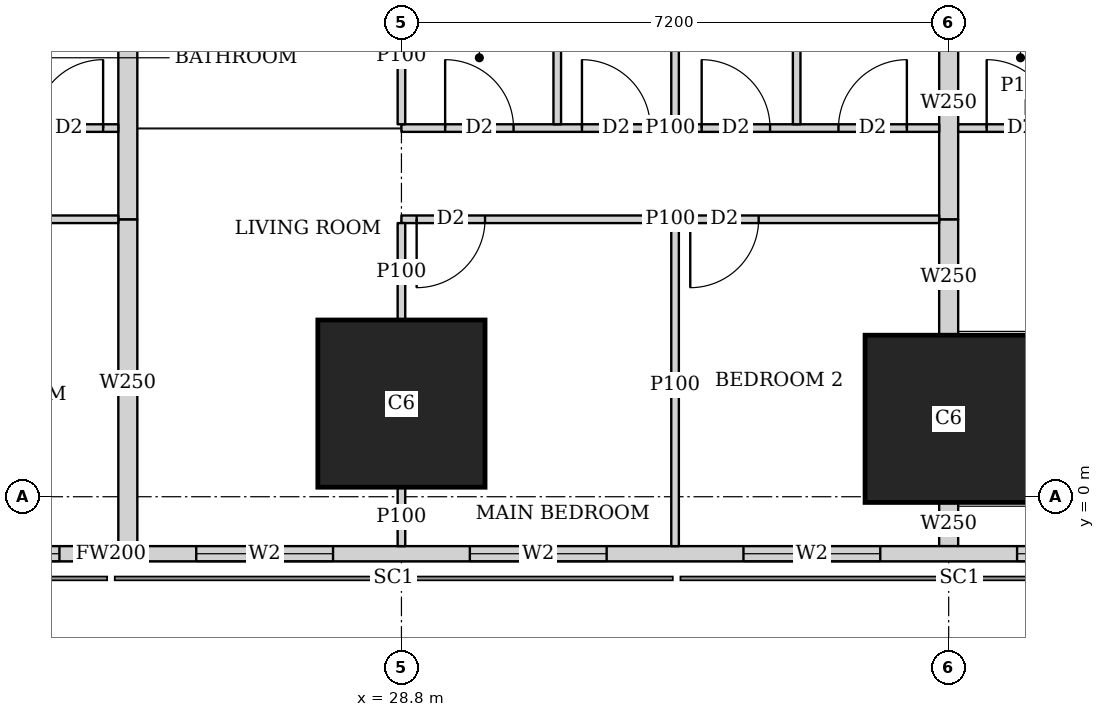
"""IFC4 building model, lengths in metres.
Left out: names, types, materials, properties, quantities, classifications, styles, units other than length and angle.
Written with IfcOpenShell. Run it as: python <this file> out.ifc"""

import sys

from ifc_helpers import new_model, si_unit, direction, frame, frame_2d, origin, origin_2d, place, context, subcontext, project, spatial, rectangle, extrude, element, fill, save


model = new_model("IFC4")
c1 = context("Model", 3, precision=1e-05, world=origin(), true_north=direction((0.0, 1.0)))
c2 = subcontext(c1, "Body", "Model", "MODEL_VIEW")
j1 = project(units=[si_unit("LENGTHUNIT", "METRE"), si_unit("PLANEANGLEUNIT", "RADIAN")], contexts=[c1])
p1 = place(None, origin())
s1 = spatial("IfcSite", under=j1, at=p1, CompositionType="ELEMENT")
p2 = place(p1, origin())
s2 = spatial("IfcBuilding", under=s1, at=p2, CompositionType="ELEMENT")
p3 = place(p2, frame((0.0, 0.0, 89.15)))
s3 = spatial("IfcBuildingStorey", under=s2, at=p3, CompositionType="ELEMENT", Elevation=89.15)
for number, where, z_axis, x_axis in (
    (1, (28.8, 1.225, 0.0), (0.0, 0.0, 1.0), (1.0, 0.0, 0.0)),
    (2, (36.0, 1.025, 0.0), (0.0, 0.0, 1.0), (1.0, 0.0, 0.0)),
):
    element("IfcColumn", number, at=place(p3, frame(where, z_axis=z_axis, x_axis=x_axis)), inside=s3, PredefinedType="COLUMN", context=c2, shape_type="SweptSolid", body=[
        extrude(rectangle(XDim=2.2, YDim=2.2, at=origin_2d()), origin(), (0.0, 0.0, 1.0), 3.75),
    ])
p4 = place(p3, frame((2.163, -0.75, 0.0), z_axis=(0.0, 0.0, 1.0), x_axis=(1.0, 0.0, 0.0)))
e3 = element("IfcWall", 3, at=p4, inside=s3, PredefinedType="SOLIDWALL", context=c2, shape_type="SweptSolid", body=[
    extrude(rectangle(XDim=45.628, YDim=0.2, at=frame_2d((22.814, 0.0))), origin(), (0.0, 0.0, 1.0), 3.5),
])
p5 = place(p4, frame((9.537, 0.0, 0.9)))
e4 = element("IfcOpeningElement", 4, at=p5, cuts=e3, PredefinedType="OPENING", context=c2, shape_type="SweptSolid", body=[
    extrude(rectangle(XDim=1.8, YDim=1.5, at=frame_2d((0.9, 0.75))), frame((0.0, 0.11, 0.0), z_axis=(0.0, -1.0, 0.0), x_axis=(1.0, 0.0, 0.0)), (0.0, 0.0, 1.0), 0.22),
])
p6 = place(p4, frame((13.137, 0.0, 0.9)))
e5 = element("IfcOpeningElement", 5, at=p6, cuts=e3, PredefinedType="OPENING", context=c2, shape_type="SweptSolid", body=[
    extrude(rectangle(XDim=1.8, YDim=1.5, at=frame_2d((0.9, 0.75))), frame((0.0, 0.11, 0.0), z_axis=(0.0, -1.0, 0.0), x_axis=(1.0, 0.0, 0.0)), (0.0, 0.0, 1.0), 0.22),
])
p7 = place(p4, frame((16.737, 0.0, 0.9)))
e6 = element("IfcOpeningElement", 6, at=p7, cuts=e3, PredefinedType="OPENING", context=c2, shape_type="SweptSolid", body=[
    extrude(rectangle(XDim=1.8, YDim=1.5, at=frame_2d((0.9, 0.75))), frame((0.0, 0.11, 0.0), z_axis=(0.0, -1.0, 0.0), x_axis=(1.0, 0.0, 0.0)), (0.0, 0.0, 1.0), 0.22),
])
p8 = place(p4, frame((20.337, 0.0, 0.9)))
e7 = element("IfcOpeningElement", 7, at=p8, cuts=e3, PredefinedType="OPENING", context=c2, shape_type="SweptSolid", body=[
    extrude(rectangle(XDim=1.8, YDim=1.5, at=frame_2d((0.9, 0.75))), frame((0.0, 0.11, 0.0), z_axis=(0.0, -1.0, 0.0), x_axis=(1.0, 0.0, 0.0)), (0.0, 0.0, 1.0), 0.22),
])
p9 = place(p4, frame((23.937, 0.0, 0.9)))
e8 = element("IfcOpeningElement", 8, at=p9, cuts=e3, PredefinedType="OPENING", context=c2, shape_type="SweptSolid", body=[
    extrude(rectangle(XDim=1.8, YDim=1.5, at=frame_2d((0.9, 0.75))), frame((0.0, 0.11, 0.0), z_axis=(0.0, -1.0, 0.0), x_axis=(1.0, 0.0, 0.0)), (0.0, 0.0, 1.0), 0.22),
])
p10 = place(p4, frame((27.537, 0.0, 0.9)))
e9 = element("IfcOpeningElement", 9, at=p10, cuts=e3, PredefinedType="OPENING", context=c2, shape_type="SweptSolid", body=[
    extrude(rectangle(XDim=1.8, YDim=1.5, at=frame_2d((0.9, 0.75))), frame((0.0, 0.11, 0.0), z_axis=(0.0, -1.0, 0.0), x_axis=(1.0, 0.0, 0.0)), (0.0, 0.0, 1.0), 0.22),
])
p11 = place(p4, frame((31.137, 0.0, 0.9)))
e10 = element("IfcOpeningElement", 10, at=p11, cuts=e3, PredefinedType="OPENING", context=c2, shape_type="SweptSolid", body=[
    extrude(rectangle(XDim=1.8, YDim=1.5, at=frame_2d((0.9, 0.75))), frame((0.0, 0.11, 0.0), z_axis=(0.0, -1.0, 0.0), x_axis=(1.0, 0.0, 0.0)), (0.0, 0.0, 1.0), 0.22),
])
p12 = place(p4, frame((34.737, 0.0, 0.9)))
e11 = element("IfcOpeningElement", 11, at=p12, cuts=e3, PredefinedType="OPENING", context=c2, shape_type="SweptSolid", body=[
    extrude(rectangle(XDim=1.8, YDim=1.5, at=frame_2d((0.9, 0.75))), frame((0.0, 0.11, 0.0), z_axis=(0.0, -1.0, 0.0), x_axis=(1.0, 0.0, 0.0)), (0.0, 0.0, 1.0), 0.22),
])
p13 = place(p3, frame((33.127, 45.65, 0.0), z_axis=(0.0, 0.0, 1.0), x_axis=(0.185598547723, -0.98262565562, 0.0)))
e12 = element("IfcWall", 12, at=p13, inside=s3, PredefinedType="SOLIDWALL", context=c2, shape_type="SweptSolid", body=[
    extrude(rectangle(XDim=47.118, YDim=0.15, at=frame_2d((23.559, 0.0))), origin(), (0.0, 0.0, 1.0), 2.2),
])
p14 = place(p13, frame((15.285, 0.0, 0.0)))
e13 = element("IfcOpeningElement", 13, at=p14, cuts=e12, PredefinedType="OPENING", context=c2, shape_type="SweptSolid", body=[
    extrude(rectangle(XDim=1.0, YDim=2.1, at=frame_2d((0.5, 1.05))), frame((0.0, 0.085, 0.0), z_axis=(0.0, -1.0, 0.0), x_axis=(1.0, 0.0, 0.0)), (0.0, 0.0, 1.0), 0.17),
])
p15 = place(p13, frame((19.102, 0.0, 0.0)))
e14 = element("IfcOpeningElement", 14, at=p15, cuts=e12, PredefinedType="OPENING", context=c2, shape_type="SweptSolid", body=[
    extrude(rectangle(XDim=1.0, YDim=2.1, at=frame_2d((0.5, 1.05))), frame((0.0, 0.085, 0.0), z_axis=(0.0, -1.0, 0.0), x_axis=(1.0, 0.0, 0.0)), (0.0, 0.0, 1.0), 0.17),
])
p16 = place(p13, frame((33.88, 0.0, 0.0)))
e15 = element("IfcOpeningElement", 15, at=p16, cuts=e12, PredefinedType="OPENING", context=c2, shape_type="SweptSolid", body=[
    extrude(rectangle(XDim=1.0, YDim=2.1, at=frame_2d((0.5, 1.05))), frame((0.0, 0.085, 0.0), z_axis=(0.0, -1.0, 0.0), x_axis=(1.0, 0.0, 0.0)), (0.0, 0.0, 1.0), 0.17),
])
p17 = place(p3, frame((25.075, 3.65, 0.0), z_axis=(0.0, 0.0, 1.0), x_axis=(-1.0, 0.0, 0.0)))
e16 = element("IfcWall", 16, at=p17, inside=s3, PredefinedType="PARTITIONING", context=c2, shape_type="SweptSolid", body=[
    extrude(rectangle(XDim=3.475, YDim=0.1, at=frame_2d((1.737, 0.0))), origin(), (0.0, 0.0, 1.0), 3.5),
])
p18 = place(p17, frame((2.375, 0.0, 0.0)))
e17 = element("IfcOpeningElement", 17, at=p18, cuts=e16, PredefinedType="OPENING", context=c2, shape_type="SweptSolid", body=[
    extrude(rectangle(XDim=0.9, YDim=2.1, at=frame_2d((0.45, 1.05))), frame((0.0, 0.06, 0.0), z_axis=(0.0, -1.0, 0.0), x_axis=(1.0, 0.0, 0.0)), (0.0, 0.0, 1.0), 0.12),
])
p19 = place(p3, frame((25.075, 4.85, 0.0), z_axis=(0.0, 0.0, 1.0), x_axis=(-1.0, 0.0, 0.0)))
e18 = element("IfcWall", 18, at=p19, inside=s3, PredefinedType="PARTITIONING", context=c2, shape_type="SweptSolid", body=[
    extrude(rectangle(XDim=3.475, YDim=0.1, at=frame_2d((1.737, 0.0))), origin(), (0.0, 0.0, 1.0), 3.5),
])
p20 = place(p19, frame((2.0, 0.0, 0.0)))
e19 = element("IfcOpeningElement", 19, at=p20, cuts=e18, PredefinedType="OPENING", context=c2, shape_type="SweptSolid", body=[
    extrude(rectangle(XDim=0.9, YDim=2.1, at=frame_2d((0.45, 1.05))), frame((0.0, 0.06, 0.0), z_axis=(0.0, -1.0, 0.0), x_axis=(1.0, 0.0, 0.0)), (0.0, 0.0, 1.0), 0.12),
])
p21 = place(p19, frame((0.2, 0.0, 0.0)))
e20 = element("IfcOpeningElement", 20, at=p21, cuts=e18, PredefinedType="OPENING", context=c2, shape_type="SweptSolid", body=[
    extrude(rectangle(XDim=0.9, YDim=2.1, at=frame_2d((0.45, 1.05))), frame((0.0, 0.06, 0.0), z_axis=(0.0, -1.0, 0.0), x_axis=(1.0, 0.0, 0.0)), (0.0, 0.0, 1.0), 0.12),
])
p22 = place(p3, frame((35.875, 3.65, 0.0), z_axis=(0.0, 0.0, 1.0), x_axis=(-1.0, 0.0, 0.0)))
e21 = element("IfcWall", 21, at=p22, inside=s3, PredefinedType="PARTITIONING", context=c2, shape_type="SweptSolid", body=[
    extrude(rectangle(XDim=7.075, YDim=0.1, at=frame_2d((3.538, 0.0))), origin(), (0.0, 0.0, 1.0), 3.5),
])
p23 = place(p22, frame((5.975, 0.0, 0.0)))
e22 = element("IfcOpeningElement", 22, at=p23, cuts=e21, PredefinedType="OPENING", context=c2, shape_type="SweptSolid", body=[
    extrude(rectangle(XDim=0.9, YDim=2.1, at=frame_2d((0.45, 1.05))), frame((0.0, 0.06, 0.0), z_axis=(0.0, -1.0, 0.0), x_axis=(1.0, 0.0, 0.0)), (0.0, 0.0, 1.0), 0.12),
])
p24 = place(p22, frame((2.375, 0.0, 0.0)))
e23 = element("IfcOpeningElement", 23, at=p24, cuts=e21, PredefinedType="OPENING", context=c2, shape_type="SweptSolid", body=[
    extrude(rectangle(XDim=0.9, YDim=2.1, at=frame_2d((0.45, 1.05))), frame((0.0, 0.06, 0.0), z_axis=(0.0, -1.0, 0.0), x_axis=(1.0, 0.0, 0.0)), (0.0, 0.0, 1.0), 0.12),
])
p25 = place(p3, frame((35.875, 4.85, 0.0), z_axis=(0.0, 0.0, 1.0), x_axis=(-1.0, 0.0, 0.0)))
e24 = element("IfcWall", 24, at=p25, inside=s3, PredefinedType="PARTITIONING", context=c2, shape_type="SweptSolid", body=[
    extrude(rectangle(XDim=7.075, YDim=0.1, at=frame_2d((3.538, 0.0))), origin(), (0.0, 0.0, 1.0), 3.5),
])
p26 = place(p25, frame((5.6, 0.0, 0.0)))
e25 = element("IfcOpeningElement", 25, at=p26, cuts=e24, PredefinedType="OPENING", context=c2, shape_type="SweptSolid", body=[
    extrude(rectangle(XDim=0.9, YDim=2.1, at=frame_2d((0.45, 1.05))), frame((0.0, 0.06, 0.0), z_axis=(0.0, -1.0, 0.0), x_axis=(1.0, 0.0, 0.0)), (0.0, 0.0, 1.0), 0.12),
])
p27 = place(p25, frame((2.225, 0.0, 0.0)))
e26 = element("IfcOpeningElement", 26, at=p27, cuts=e24, PredefinedType="OPENING", context=c2, shape_type="SweptSolid", body=[
    extrude(rectangle(XDim=0.9, YDim=2.1, at=frame_2d((0.45, 1.05))), frame((0.0, 0.06, 0.0), z_axis=(0.0, -1.0, 0.0), x_axis=(1.0, 0.0, 0.0)), (0.0, 0.0, 1.0), 0.12),
])
p28 = place(p25, frame((3.8, 0.0, 0.0)))
e27 = element("IfcOpeningElement", 27, at=p28, cuts=e24, PredefinedType="OPENING", context=c2, shape_type="SweptSolid", body=[
    extrude(rectangle(XDim=0.9, YDim=2.1, at=frame_2d((0.45, 1.05))), frame((0.0, 0.06, 0.0), z_axis=(0.0, -1.0, 0.0), x_axis=(1.0, 0.0, 0.0)), (0.0, 0.0, 1.0), 0.12),
])
p29 = place(p25, frame((0.425, 0.0, 0.0)))
e28 = element("IfcOpeningElement", 28, at=p29, cuts=e24, PredefinedType="OPENING", context=c2, shape_type="SweptSolid", body=[
    extrude(rectangle(XDim=0.9, YDim=2.1, at=frame_2d((0.45, 1.05))), frame((0.0, 0.06, 0.0), z_axis=(0.0, -1.0, 0.0), x_axis=(1.0, 0.0, 0.0)), (0.0, 0.0, 1.0), 0.12),
])
p30 = place(p3, frame((28.8, -0.65, 0.0), z_axis=(0.0, 0.0, 1.0), x_axis=(0.0, 1.0, 0.0)))
e29 = element("IfcWall", 29, at=p30, inside=s3, PredefinedType="PARTITIONING", context=c2, shape_type="SweptSolid", body=[
    extrude(rectangle(XDim=0.774, YDim=0.1, at=frame_2d((0.387, 0.0))), origin(), (0.0, 0.0, 1.0), 3.5),
])
p31 = place(p3, frame((28.8, 2.326, 0.0), z_axis=(0.0, 0.0, 1.0), x_axis=(0.0, 1.0, 0.0)))
e30 = element("IfcWall", 30, at=p31, inside=s3, PredefinedType="PARTITIONING", context=c2, shape_type="SweptSolid", body=[
    extrude(rectangle(XDim=1.274, YDim=0.1, at=frame_2d((0.637, 0.0))), origin(), (0.0, 0.0, 1.0), 3.5),
])
p32 = place(p3, frame((32.4, -0.65, 0.0), z_axis=(0.0, 0.0, 1.0), x_axis=(0.0, 1.0, 0.0)))
e31 = element("IfcWall", 31, at=p32, inside=s3, PredefinedType="PARTITIONING", context=c2, shape_type="SweptSolid", body=[
    extrude(rectangle(XDim=4.25, YDim=0.1, at=frame_2d((2.125, 0.0))), origin(), (0.0, 0.0, 1.0), 2.2),
])
p33 = place(p3, frame((28.8, 4.9, 0.0), z_axis=(0.0, 0.0, 1.0), x_axis=(0.0, 1.0, 0.0)))
e32 = element("IfcWall", 32, at=p33, inside=s3, PredefinedType="PARTITIONING", context=c2, shape_type="SweptSolid", body=[
    extrude(rectangle(XDim=1.799, YDim=0.1, at=frame_2d((0.899, 0.0))), origin(), (0.0, 0.0, 1.0), 3.5),
])
for number, where, z_axis, x_axis in (
    (33, (32.4, 4.9, 0.0), (0.0, 0.0, 1.0), (0.0, 1.0, 0.0)),
    (34, (30.85, 4.9, 0.0), (0.0, 0.0, 1.0), (0.0, 1.0, 0.0)),
    (35, (34.0, 4.9, 0.0), (0.0, 0.0, 1.0), (0.0, 1.0, 0.0)),
):
    element("IfcWall", number, at=place(p3, frame(where, z_axis=z_axis, x_axis=x_axis)), inside=s3, PredefinedType="PARTITIONING", context=c2, shape_type="SweptSolid", body=[
        extrude(rectangle(XDim=3.525, YDim=0.1, at=frame_2d((1.763, 0.0))), origin(), (0.0, 0.0, 1.0), 3.5),
    ])
p34 = place(p3, frame((25.2, -0.65, 0.0), z_axis=(0.0, 0.0, 1.0), x_axis=(0.0, 1.0, 0.0)))
e36 = element("IfcWall", 36, at=p34, inside=s3, PredefinedType="SOLIDWALL", context=c2, shape_type="SweptSolid", body=[
    extrude(rectangle(XDim=4.3, YDim=0.25, at=frame_2d((2.15, 0.0))), origin(), (0.0, 0.0, 1.0), 2.2),
])
p35 = place(p3, frame((25.2, 3.65, 0.0), z_axis=(0.0, 0.0, 1.0), x_axis=(0.0, 1.0, 0.0)))
e37 = element("IfcWall", 37, at=p35, inside=s3, PredefinedType="SOLIDWALL", context=c2, shape_type="SweptSolid", body=[
    extrude(rectangle(XDim=4.775, YDim=0.25, at=frame_2d((2.388, 0.0))), origin(), (0.0, 0.0, 1.0), 3.5),
])
p36 = place(p3, frame((37.89, 4.85, 0.0), z_axis=(0.0, 0.0, 1.0), x_axis=(-1.0, 0.0, 0.0)))
e38 = element("IfcWall", 38, at=p36, inside=s3, PredefinedType="PARTITIONING", context=c2, shape_type="SweptSolid", body=[
    extrude(rectangle(XDim=1.765, YDim=0.1, at=frame_2d((0.882, 0.0))), origin(), (0.0, 0.0, 1.0), 3.5),
])
p37 = place(p36, frame((0.49, 0.0, 0.0)))
e39 = element("IfcOpeningElement", 39, at=p37, cuts=e38, PredefinedType="OPENING", context=c2, shape_type="SweptSolid", body=[
    extrude(rectangle(XDim=0.9, YDim=2.1, at=frame_2d((0.45, 1.05))), frame((0.0, 0.06, 0.0), z_axis=(0.0, -1.0, 0.0), x_axis=(1.0, 0.0, 0.0)), (0.0, 0.0, 1.0), 0.12),
])
p38 = place(p3, frame((36.0, -0.65, 0.0), z_axis=(0.0, 0.0, 1.0), x_axis=(0.0, 1.0, 0.0)))
e40 = element("IfcWall", 40, at=p38, inside=s3, PredefinedType="SOLIDWALL", context=c2, shape_type="SweptSolid", body=[
    extrude(rectangle(XDim=0.574, YDim=0.25, at=frame_2d((0.287, 0.0))), origin(), (0.0, 0.0, 1.0), 3.5),
])
p39 = place(p3, frame((36.0, 2.126, 0.0), z_axis=(0.0, 0.0, 1.0), x_axis=(0.0, 1.0, 0.0)))
e41 = element("IfcWall", 41, at=p39, inside=s3, PredefinedType="SOLIDWALL", context=c2, shape_type="SweptSolid", body=[
    extrude(rectangle(XDim=1.524, YDim=0.25, at=frame_2d((0.762, 0.0))), origin(), (0.0, 0.0, 1.0), 3.5),
])
p40 = place(p3, frame((36.0, 3.65, 0.0), z_axis=(0.0, 0.0, 1.0), x_axis=(0.0, 1.0, 0.0)))
e42 = element("IfcWall", 42, at=p40, inside=s3, PredefinedType="SOLIDWALL", context=c2, shape_type="SweptSolid", body=[
    extrude(rectangle(XDim=3.049, YDim=0.25, at=frame_2d((1.524, 0.0))), origin(), (0.0, 0.0, 1.0), 3.5),
])
p41 = place(p8, origin())
e43 = element("IfcWindow", 43, at=p41, inside=s3, PartitioningType="SINGLE_PANEL", PredefinedType="WINDOW", context=c2, shape_type="SweptSolid", body=[
    extrude(rectangle(XDim=1.8, YDim=1.5, at=frame_2d((0.9, 0.75))), frame((0.0, 0.03, 0.0), z_axis=(0.0, -1.0, 0.0), x_axis=(1.0, 0.0, 0.0)), (0.0, 0.0, 1.0), 0.06),
])
fill(e7, e43)
p42 = place(p9, origin())
e44 = element("IfcWindow", 44, at=p42, inside=s3, PartitioningType="SINGLE_PANEL", PredefinedType="WINDOW", context=c2, shape_type="SweptSolid", body=[
    extrude(rectangle(XDim=1.8, YDim=1.5, at=frame_2d((0.9, 0.75))), frame((0.0, 0.03, 0.0), z_axis=(0.0, -1.0, 0.0), x_axis=(1.0, 0.0, 0.0)), (0.0, 0.0, 1.0), 0.06),
])
fill(e8, e44)
p43 = place(p10, origin())
e45 = element("IfcWindow", 45, at=p43, inside=s3, PartitioningType="SINGLE_PANEL", PredefinedType="WINDOW", context=c2, shape_type="SweptSolid", body=[
    extrude(rectangle(XDim=1.8, YDim=1.5, at=frame_2d((0.9, 0.75))), frame((0.0, 0.03, 0.0), z_axis=(0.0, -1.0, 0.0), x_axis=(1.0, 0.0, 0.0)), (0.0, 0.0, 1.0), 0.06),
])
fill(e9, e45)
p44 = place(p11, origin())
e46 = element("IfcWindow", 46, at=p44, inside=s3, PartitioningType="SINGLE_PANEL", PredefinedType="WINDOW", context=c2, shape_type="SweptSolid", body=[
    extrude(rectangle(XDim=1.8, YDim=1.5, at=frame_2d((0.9, 0.75))), frame((0.0, 0.03, 0.0), z_axis=(0.0, -1.0, 0.0), x_axis=(1.0, 0.0, 0.0)), (0.0, 0.0, 1.0), 0.06),
])
fill(e10, e46)
p45 = place(p12, origin())
e47 = element("IfcWindow", 47, at=p45, inside=s3, PartitioningType="SINGLE_PANEL", PredefinedType="WINDOW", context=c2, shape_type="SweptSolid", body=[
    extrude(rectangle(XDim=1.8, YDim=1.5, at=frame_2d((0.9, 0.75))), frame((0.0, 0.03, 0.0), z_axis=(0.0, -1.0, 0.0), x_axis=(1.0, 0.0, 0.0)), (0.0, 0.0, 1.0), 0.06),
])
fill(e11, e47)
p46 = place(p21, origin())
e48 = element("IfcDoor", 48, at=p46, inside=s3, OperationType="SINGLE_SWING_RIGHT", PredefinedType="DOOR", context=c2, shape_type="SweptSolid", body=[
    extrude(rectangle(XDim=0.9, YDim=2.1, at=frame_2d((0.45, 1.05))), frame((0.0, 0.025, 0.0), z_axis=(0.0, -1.0, 0.0), x_axis=(1.0, 0.0, 0.0)), (0.0, 0.0, 1.0), 0.05),
])
fill(e20, e48)
p47 = place(p23, origin())
e49 = element("IfcDoor", 49, at=p47, inside=s3, OperationType="SINGLE_SWING_RIGHT", PredefinedType="DOOR", context=c2, shape_type="SweptSolid", body=[
    extrude(rectangle(XDim=0.9, YDim=2.1, at=frame_2d((0.45, 1.05))), frame((0.0, 0.025, 0.0), z_axis=(0.0, -1.0, 0.0), x_axis=(1.0, 0.0, 0.0)), (0.0, 0.0, 1.0), 0.05),
])
fill(e22, e49)
p48 = place(p24, origin())
e50 = element("IfcDoor", 50, at=p48, inside=s3, OperationType="SINGLE_SWING_RIGHT", PredefinedType="DOOR", context=c2, shape_type="SweptSolid", body=[
    extrude(rectangle(XDim=0.9, YDim=2.1, at=frame_2d((0.45, 1.05))), frame((0.0, 0.025, 0.0), z_axis=(0.0, -1.0, 0.0), x_axis=(1.0, 0.0, 0.0)), (0.0, 0.0, 1.0), 0.05),
])
fill(e23, e50)
p49 = place(p26, origin())
e51 = element("IfcDoor", 51, at=p49, inside=s3, OperationType="SINGLE_SWING_LEFT", PredefinedType="DOOR", context=c2, shape_type="SweptSolid", body=[
    extrude(rectangle(XDim=0.9, YDim=2.1, at=frame_2d((0.45, 1.05))), frame((0.0, 0.025, 0.0), z_axis=(0.0, -1.0, 0.0), x_axis=(1.0, 0.0, 0.0)), (0.0, 0.0, 1.0), 0.05),
])
fill(e25, e51)
p50 = place(p27, origin())
e52 = element("IfcDoor", 52, at=p50, inside=s3, OperationType="SINGLE_SWING_LEFT", PredefinedType="DOOR", context=c2, shape_type="SweptSolid", body=[
    extrude(rectangle(XDim=0.9, YDim=2.1, at=frame_2d((0.45, 1.05))), frame((0.0, 0.025, 0.0), z_axis=(0.0, -1.0, 0.0), x_axis=(1.0, 0.0, 0.0)), (0.0, 0.0, 1.0), 0.05),
])
fill(e26, e52)
p51 = place(p28, origin())
e53 = element("IfcDoor", 53, at=p51, inside=s3, OperationType="SINGLE_SWING_LEFT", PredefinedType="DOOR", context=c2, shape_type="SweptSolid", body=[
    extrude(rectangle(XDim=0.9, YDim=2.1, at=frame_2d((0.45, 1.05))), frame((0.0, 0.025, 0.0), z_axis=(0.0, -1.0, 0.0), x_axis=(1.0, 0.0, 0.0)), (0.0, 0.0, 1.0), 0.05),
])
fill(e27, e53)
p52 = place(p29, origin())
e54 = element("IfcDoor", 54, at=p52, inside=s3, OperationType="SINGLE_SWING_RIGHT", PredefinedType="DOOR", context=c2, shape_type="SweptSolid", body=[
    extrude(rectangle(XDim=0.9, YDim=2.1, at=frame_2d((0.45, 1.05))), frame((0.0, 0.025, 0.0), z_axis=(0.0, -1.0, 0.0), x_axis=(1.0, 0.0, 0.0)), (0.0, 0.0, 1.0), 0.05),
])
fill(e28, e54)
p53 = place(p37, origin())
e55 = element("IfcDoor", 55, at=p53, inside=s3, OperationType="SINGLE_SWING_LEFT", PredefinedType="DOOR", context=c2, shape_type="SweptSolid", body=[
    extrude(rectangle(XDim=0.9, YDim=2.1, at=frame_2d((0.45, 1.05))), frame((0.0, 0.025, 0.0), z_axis=(0.0, -1.0, 0.0), x_axis=(1.0, 0.0, 0.0)), (0.0, 0.0, 1.0), 0.05),
])
fill(e39, e55)
save(model, sys.argv[1])
